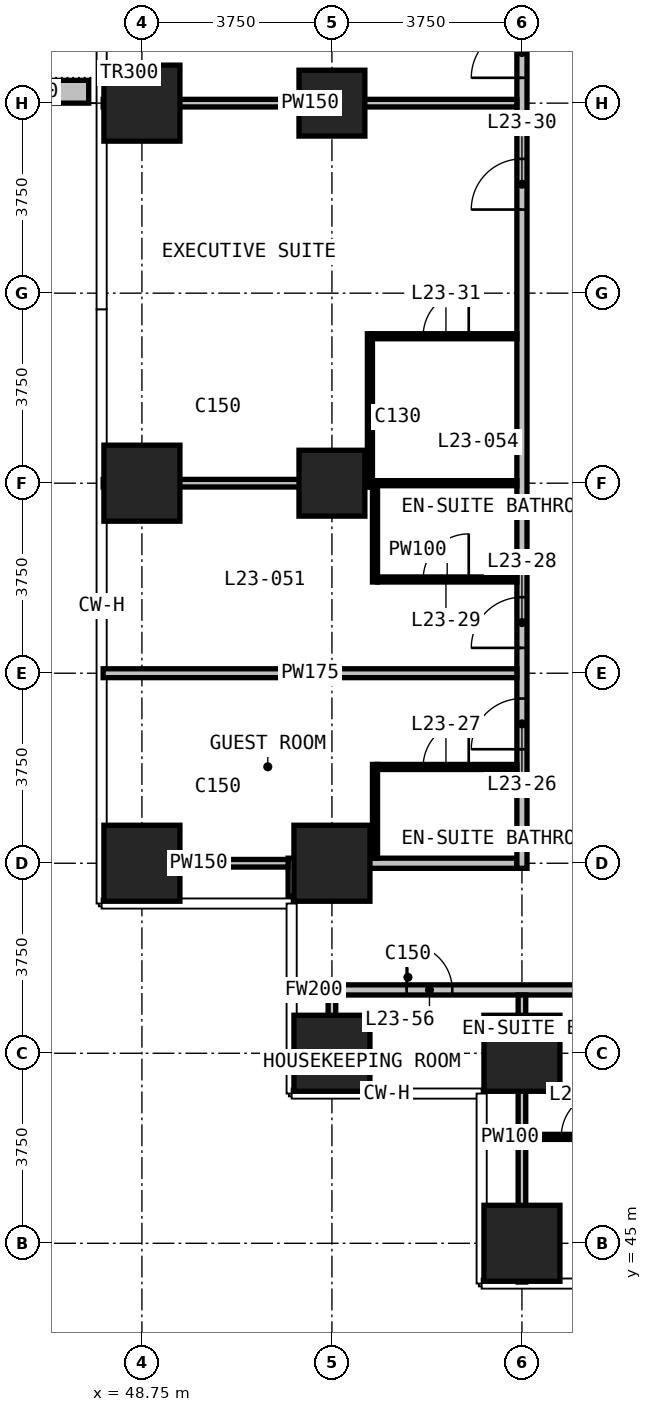
"""IFC4 building model, lengths in metres.
Left out: names, types, materials, properties, quantities, classifications, styles, units other than length and angle.
Written with IfcOpenShell. Run it as: python <this file> out.ifc"""

import sys

from ifc_helpers import new_model, si_unit, direction, frame, frame_2d, origin, origin_2d, place, context, subcontext, project, spatial, rectangle, extrude, element, fill, save


model = new_model("IFC4")
c1 = context("Model", 3, precision=1e-05, world=origin(), true_north=direction((0.0, 1.0)))
c2 = subcontext(c1, "Body", "Model", "MODEL_VIEW")
j1 = project(units=[si_unit("LENGTHUNIT", "METRE"), si_unit("PLANEANGLEUNIT", "RADIAN")], contexts=[c1])
p1 = place(None, origin())
s1 = spatial("IfcSite", under=j1, at=p1, CompositionType="ELEMENT")
p2 = place(p1, origin())
s2 = spatial("IfcBuilding", under=s1, at=p2, CompositionType="ELEMENT")
p3 = place(p2, frame((0.0, 0.0, 95.6)))
s3 = spatial("IfcBuildingStorey", under=s2, at=p3, CompositionType="ELEMENT", Elevation=95.6)
for number, where, z_axis, x_axis in (
    (1, (48.75, 52.5, 0.0), (0.0, 0.0, 1.0), (1.0, 0.0, 0.0)),
    (2, (48.75, 60.0, 0.0), (0.0, 0.0, 1.0), (1.0, 0.0, 0.0)),
    (3, (48.75, 67.5, 0.0), (0.0, 0.0, 1.0), (1.0, 0.0, 0.0)),
    (4, (52.5, 48.75, 0.0), (0.0, 0.0, 1.0), (1.0, 0.0, 0.0)),
    (5, (52.5, 52.5, 0.0), (0.0, 0.0, 1.0), (1.0, 0.0, 0.0)),
):
    element("IfcColumn", number, at=place(p3, frame(where, z_axis=z_axis, x_axis=x_axis)), inside=s3, PredefinedType="COLUMN", context=c2, shape_type="SweptSolid", body=[
        extrude(rectangle(XDim=1.5, YDim=1.5, at=origin_2d()), origin(), (0.0, 0.0, 1.0), 3.3),
    ])
for number, where, z_axis, x_axis in (
    (6, (52.5, 60.0, 0.0), (0.0, 0.0, 1.0), (1.0, 0.0, 0.0)),
    (7, (52.5, 67.5, 0.0), (0.0, 0.0, 1.0), (1.0, 0.0, 0.0)),
):
    element("IfcColumn", number, at=place(p3, frame(where, z_axis=z_axis, x_axis=x_axis)), inside=s3, PredefinedType="COLUMN", context=c2, shape_type="SweptSolid", body=[
        extrude(rectangle(XDim=1.3, YDim=1.3, at=origin_2d()), origin(), (0.0, 0.0, 1.0), 3.3),
    ])
for number, where, z_axis, x_axis in (
    (8, (56.25, 45.0, 0.0), (0.0, 0.0, 1.0), (1.0, 0.0, 0.0)),
    (9, (56.25, 48.75, 0.0), (0.0, 0.0, 1.0), (1.0, 0.0, 0.0)),
):
    element("IfcColumn", number, at=place(p3, frame(where, z_axis=z_axis, x_axis=x_axis)), inside=s3, PredefinedType="COLUMN", context=c2, shape_type="SweptSolid", body=[
        extrude(rectangle(XDim=1.5, YDim=1.5, at=origin_2d()), origin(), (0.0, 0.0, 1.0), 3.3),
    ])
p4 = place(p3, frame((47.7, 67.725, 0.0), z_axis=(0.0, 0.0, 1.0), x_axis=(-1.0, 0.0, 0.0)))
e10 = element("IfcWall", 10, at=p4, inside=s3, PredefinedType="USERDEFINED", context=c2, shape_type="SweptSolid", body=[
    extrude(rectangle(XDim=2.35, YDim=0.45, at=frame_2d((1.175, 0.0))), origin(), (0.0, 0.0, 1.0), 1.1),
])
p5 = place(p3, frame((51.855, 50.0, 0.0), z_axis=(0.0, 0.0, 1.0), x_axis=(1.0, 0.0, 0.0)))
e11 = element("IfcWall", 11, at=p5, inside=s3, PredefinedType="PARTITIONING", context=c2, shape_type="SweptSolid", body=[
    extrude(rectangle(XDim=0.57, YDim=0.2, at=frame_2d((0.285, 0.0))), origin(), (0.0, 0.0, 1.0), 3.0),
])
p6 = place(p3, frame((52.575, 50.0, 0.0), z_axis=(0.0, 0.0, 1.0), x_axis=(1.0, 0.0, 0.0)))
e12 = element("IfcWall", 12, at=p6, inside=s3, PredefinedType="PARTITIONING", context=c2, shape_type="SweptSolid", body=[
    extrude(rectangle(XDim=44.85, YDim=0.2, at=frame_2d((22.425, 0.0))), origin(), (0.0, 0.0, 1.0), 3.0),
])
p7 = place(p6, frame((5.925, 0.0, 0.0)))
e13 = element("IfcOpeningElement", 13, at=p7, cuts=e12, PredefinedType="OPENING", context=c2, shape_type="SweptSolid", body=[
    extrude(rectangle(XDim=1.0, YDim=2.2, at=frame_2d((0.5, 1.1))), frame((0.0, 0.11, 0.0), z_axis=(0.0, -1.0, 0.0), x_axis=(1.0, 0.0, 0.0)), (0.0, 0.0, 1.0), 0.22),
])
p8 = place(p6, frame((7.925, 0.0, 0.0)))
e14 = element("IfcOpeningElement", 14, at=p8, cuts=e12, PredefinedType="OPENING", context=c2, shape_type="SweptSolid", body=[
    extrude(rectangle(XDim=1.0, YDim=2.2, at=frame_2d((0.5, 1.1))), frame((0.0, 0.11, 0.0), z_axis=(0.0, -1.0, 0.0), x_axis=(1.0, 0.0, 0.0)), (0.0, 0.0, 1.0), 0.22),
])
p9 = place(p6, frame((13.425, 0.0, 0.0)))
e15 = element("IfcOpeningElement", 15, at=p9, cuts=e12, PredefinedType="OPENING", context=c2, shape_type="SweptSolid", body=[
    extrude(rectangle(XDim=1.0, YDim=2.2, at=frame_2d((0.5, 1.1))), frame((0.0, 0.11, 0.0), z_axis=(0.0, -1.0, 0.0), x_axis=(1.0, 0.0, 0.0)), (0.0, 0.0, 1.0), 0.22),
])
p10 = place(p6, frame((15.425, 0.0, 0.0)))
e16 = element("IfcOpeningElement", 16, at=p10, cuts=e12, PredefinedType="OPENING", context=c2, shape_type="SweptSolid", body=[
    extrude(rectangle(XDim=1.0, YDim=2.2, at=frame_2d((0.5, 1.1))), frame((0.0, 0.11, 0.0), z_axis=(0.0, -1.0, 0.0), x_axis=(1.0, 0.0, 0.0)), (0.0, 0.0, 1.0), 0.22),
])
p11 = place(p6, frame((20.925, 0.0, 0.0)))
e17 = element("IfcOpeningElement", 17, at=p11, cuts=e12, PredefinedType="OPENING", context=c2, shape_type="SweptSolid", body=[
    extrude(rectangle(XDim=1.0, YDim=2.2, at=frame_2d((0.5, 1.1))), frame((0.0, 0.11, 0.0), z_axis=(0.0, -1.0, 0.0), x_axis=(1.0, 0.0, 0.0)), (0.0, 0.0, 1.0), 0.22),
])
p12 = place(p6, frame((22.925, 0.0, 0.0)))
e18 = element("IfcOpeningElement", 18, at=p12, cuts=e12, PredefinedType="OPENING", context=c2, shape_type="SweptSolid", body=[
    extrude(rectangle(XDim=1.0, YDim=2.2, at=frame_2d((0.5, 1.1))), frame((0.0, 0.11, 0.0), z_axis=(0.0, -1.0, 0.0), x_axis=(1.0, 0.0, 0.0)), (0.0, 0.0, 1.0), 0.22),
])
p13 = place(p6, frame((28.425, 0.0, 0.0)))
e19 = element("IfcOpeningElement", 19, at=p13, cuts=e12, PredefinedType="OPENING", context=c2, shape_type="SweptSolid", body=[
    extrude(rectangle(XDim=1.0, YDim=2.2, at=frame_2d((0.5, 1.1))), frame((0.0, 0.11, 0.0), z_axis=(0.0, -1.0, 0.0), x_axis=(1.0, 0.0, 0.0)), (0.0, 0.0, 1.0), 0.22),
])
p14 = place(p6, frame((30.425, 0.0, 0.0)))
e20 = element("IfcOpeningElement", 20, at=p14, cuts=e12, PredefinedType="OPENING", context=c2, shape_type="SweptSolid", body=[
    extrude(rectangle(XDim=1.0, YDim=2.2, at=frame_2d((0.5, 1.1))), frame((0.0, 0.11, 0.0), z_axis=(0.0, -1.0, 0.0), x_axis=(1.0, 0.0, 0.0)), (0.0, 0.0, 1.0), 0.22),
])
p15 = place(p6, frame((35.925, 0.0, 0.0)))
e21 = element("IfcOpeningElement", 21, at=p15, cuts=e12, PredefinedType="OPENING", context=c2, shape_type="SweptSolid", body=[
    extrude(rectangle(XDim=1.0, YDim=2.2, at=frame_2d((0.5, 1.1))), frame((0.0, 0.11, 0.0), z_axis=(0.0, -1.0, 0.0), x_axis=(1.0, 0.0, 0.0)), (0.0, 0.0, 1.0), 0.22),
])
p16 = place(p6, frame((37.925, 0.0, 0.0)))
e22 = element("IfcOpeningElement", 22, at=p16, cuts=e12, PredefinedType="OPENING", context=c2, shape_type="SweptSolid", body=[
    extrude(rectangle(XDim=1.0, YDim=2.2, at=frame_2d((0.5, 1.1))), frame((0.0, 0.11, 0.0), z_axis=(0.0, -1.0, 0.0), x_axis=(1.0, 0.0, 0.0)), (0.0, 0.0, 1.0), 0.22),
])
p17 = place(p6, frame((1.4, 0.0, 0.0)))
e23 = element("IfcOpeningElement", 23, at=p17, cuts=e12, PredefinedType="OPENING", context=c2, shape_type="SweptSolid", body=[
    extrude(rectangle(XDim=0.9, YDim=2.2, at=frame_2d((0.45, 1.1))), frame((0.0, 0.11, 0.0), z_axis=(0.0, -1.0, 0.0), x_axis=(1.0, 0.0, 0.0)), (0.0, 0.0, 1.0), 0.22),
])
p18 = place(p6, frame((42.575, 0.0, 0.0)))
e24 = element("IfcOpeningElement", 24, at=p18, cuts=e12, PredefinedType="OPENING", context=c2, shape_type="SweptSolid", body=[
    extrude(rectangle(XDim=0.9, YDim=2.2, at=frame_2d((0.45, 1.1))), frame((0.0, 0.11, 0.0), z_axis=(0.0, -1.0, 0.0), x_axis=(1.0, 0.0, 0.0)), (0.0, 0.0, 1.0), 0.22),
])
p19 = place(p3, frame((51.835, 52.5, 0.0), z_axis=(0.0, 0.0, 1.0), x_axis=(1.0, 0.0, 0.0)))
e25 = element("IfcWall", 25, at=p19, inside=s3, PredefinedType="PARTITIONING", context=c2, shape_type="SweptSolid", body=[
    extrude(rectangle(XDim=4.315, YDim=0.2, at=frame_2d((2.157, 0.0))), origin(), (0.0, 0.0, 1.0), 3.0),
])
p20 = place(p3, frame((51.735, 51.855, 0.0), z_axis=(0.0, 0.0, 1.0), x_axis=(0.0, 1.0, 0.0)))
e26 = element("IfcWall", 26, at=p20, inside=s3, PredefinedType="PARTITIONING", context=c2, shape_type="SweptSolid", body=[
    extrude(rectangle(XDim=0.745, YDim=0.2, at=frame_2d((0.373, 0.0))), origin(), (0.0, 0.0, 1.0), 3.0),
])
p21 = place(p3, frame((56.25, 52.4, 0.0), z_axis=(0.0, 0.0, 1.0), x_axis=(0.0, 1.0, 0.0)))
e27 = element("IfcWall", 27, at=p21, inside=s3, PredefinedType="PARTITIONING", context=c2, shape_type="SweptSolid", body=[
    extrude(rectangle(XDim=38.31, YDim=0.2, at=frame_2d((19.155, 0.0))), origin(), (0.0, 0.0, 1.0), 3.0),
])
p22 = place(p21, frame((2.35, 0.0, 0.0)))
e28 = element("IfcOpeningElement", 28, at=p22, cuts=e27, PredefinedType="OPENING", context=c2, shape_type="SweptSolid", body=[
    extrude(rectangle(XDim=1.0, YDim=2.2, at=frame_2d((0.5, 1.1))), frame((0.0, 0.11, 0.0), z_axis=(0.0, -1.0, 0.0), x_axis=(1.0, 0.0, 0.0)), (0.0, 0.0, 1.0), 0.22),
])
p23 = place(p21, frame((4.35, 0.0, 0.0)))
e29 = element("IfcOpeningElement", 29, at=p23, cuts=e27, PredefinedType="OPENING", context=c2, shape_type="SweptSolid", body=[
    extrude(rectangle(XDim=1.0, YDim=2.2, at=frame_2d((0.5, 1.1))), frame((0.0, 0.11, 0.0), z_axis=(0.0, -1.0, 0.0), x_axis=(1.0, 0.0, 0.0)), (0.0, 0.0, 1.0), 0.22),
])
p24 = place(p21, frame((13.0, 0.0, 0.0)))
e30 = element("IfcOpeningElement", 30, at=p24, cuts=e27, PredefinedType="OPENING", context=c2, shape_type="SweptSolid", body=[
    extrude(rectangle(XDim=1.0, YDim=2.2, at=frame_2d((0.5, 1.1))), frame((0.0, 0.11, 0.0), z_axis=(0.0, -1.0, 0.0), x_axis=(1.0, 0.0, 0.0)), (0.0, 0.0, 1.0), 0.22),
])
p25 = place(p21, frame((15.6, 0.0, 0.0)))
e31 = element("IfcOpeningElement", 31, at=p25, cuts=e27, PredefinedType="OPENING", context=c2, shape_type="SweptSolid", body=[
    extrude(rectangle(XDim=1.0, YDim=2.2, at=frame_2d((0.5, 1.1))), frame((0.0, 0.11, 0.0), z_axis=(0.0, -1.0, 0.0), x_axis=(1.0, 0.0, 0.0)), (0.0, 0.0, 1.0), 0.22),
])
p26 = place(p21, frame((21.1, 0.0, 0.0)))
e32 = element("IfcOpeningElement", 32, at=p26, cuts=e27, PredefinedType="OPENING", context=c2, shape_type="SweptSolid", body=[
    extrude(rectangle(XDim=1.0, YDim=2.2, at=frame_2d((0.5, 1.1))), frame((0.0, 0.11, 0.0), z_axis=(0.0, -1.0, 0.0), x_axis=(1.0, 0.0, 0.0)), (0.0, 0.0, 1.0), 0.22),
])
p27 = place(p21, frame((23.7, 0.0, 0.0)))
e33 = element("IfcOpeningElement", 33, at=p27, cuts=e27, PredefinedType="OPENING", context=c2, shape_type="SweptSolid", body=[
    extrude(rectangle(XDim=1.0, YDim=2.2, at=frame_2d((0.5, 1.1))), frame((0.0, 0.11, 0.0), z_axis=(0.0, -1.0, 0.0), x_axis=(1.0, 0.0, 0.0)), (0.0, 0.0, 1.0), 0.22),
])
p28 = place(p21, frame((31.55, 0.0, 0.0)))
e34 = element("IfcOpeningElement", 34, at=p28, cuts=e27, PredefinedType="OPENING", context=c2, shape_type="SweptSolid", body=[
    extrude(rectangle(XDim=0.9, YDim=2.2, at=frame_2d((0.45, 1.1))), frame((0.0, 0.11, 0.0), z_axis=(0.0, -1.0, 0.0), x_axis=(1.0, 0.0, 0.0)), (0.0, 0.0, 1.0), 0.22),
])
p29 = place(p21, frame((35.65, 0.0, 0.0)))
e35 = element("IfcOpeningElement", 35, at=p29, cuts=e27, PredefinedType="OPENING", context=c2, shape_type="SweptSolid", body=[
    extrude(rectangle(XDim=0.9, YDim=2.2, at=frame_2d((0.45, 1.1))), frame((0.0, 0.11, 0.0), z_axis=(0.0, -1.0, 0.0), x_axis=(1.0, 0.0, 0.0)), (0.0, 0.0, 1.0), 0.22),
])
p30 = place(p3, frame((47.985, 56.25, 0.0), z_axis=(0.0, 0.0, 1.0), x_axis=(1.0, 0.0, 0.0)))
e36 = element("IfcWall", 36, at=p30, inside=s3, PredefinedType="PARTITIONING", context=c2, shape_type="SweptSolid", body=[
    extrude(rectangle(XDim=8.165, YDim=0.175, at=frame_2d((4.083, 0.0))), origin(), (0.0, 0.0, 1.0), 3.0),
])
p31 = place(p3, frame((48.105, 52.5, 0.0), z_axis=(0.0, 0.0, 1.0), x_axis=(1.0, 0.0, 0.0)))
e37 = element("IfcWall", 37, at=p31, inside=s3, PredefinedType="PARTITIONING", context=c2, shape_type="SweptSolid", body=[
    extrude(rectangle(XDim=3.53, YDim=0.15, at=frame_2d((1.765, 0.0))), origin(), (0.0, 0.0, 1.0), 3.0),
])
p32 = place(p3, frame((47.985, 60.0, 0.0), z_axis=(0.0, 0.0, 1.0), x_axis=(1.0, 0.0, 0.0)))
e38 = element("IfcWall", 38, at=p32, inside=s3, PredefinedType="PARTITIONING", context=c2, shape_type="SweptSolid", body=[
    extrude(rectangle(XDim=5.215, YDim=0.15, at=frame_2d((2.607, 0.0))), origin(), (0.0, 0.0, 1.0), 3.0),
])
p33 = place(p3, frame((47.985, 67.5, 0.0), z_axis=(0.0, 0.0, 1.0), x_axis=(1.0, 0.0, 0.0)))
e39 = element("IfcWall", 39, at=p33, inside=s3, PredefinedType="PARTITIONING", context=c2, shape_type="SweptSolid", body=[
    extrude(rectangle(XDim=8.165, YDim=0.15, at=frame_2d((4.083, 0.0))), origin(), (0.0, 0.0, 1.0), 3.0),
])
p34 = place(p3, frame((52.5, 48.105, 0.0), z_axis=(0.0, 0.0, 1.0), x_axis=(0.0, 1.0, 0.0)))
e40 = element("IfcWall", 40, at=p34, inside=s3, PredefinedType="PARTITIONING", context=c2, shape_type="SweptSolid", body=[
    extrude(rectangle(XDim=1.995, YDim=0.15, at=frame_2d((0.998, 0.0))), origin(), (0.0, 0.0, 1.0), 3.0),
])
p35 = place(p3, frame((56.25, 44.235, 0.0), z_axis=(0.0, 0.0, 1.0), x_axis=(0.0, 1.0, 0.0)))
e41 = element("IfcWall", 41, at=p35, inside=s3, PredefinedType="PARTITIONING", context=c2, shape_type="SweptSolid", body=[
    extrude(rectangle(XDim=5.665, YDim=0.15, at=frame_2d((2.833, 0.0))), origin(), (0.0, 0.0, 1.0), 3.0),
])
p36 = place(p3, frame((56.325, 47.1, 0.0), z_axis=(0.0, 0.0, 1.0), x_axis=(1.0, 0.0, 0.0)))
e42 = element("IfcWall", 42, at=p36, inside=s3, PredefinedType="PARTITIONING", context=c2, shape_type="SweptSolid", body=[
    extrude(rectangle(XDim=1.775, YDim=0.1, at=frame_2d((0.888, 0.0))), origin(), (0.0, 0.0, 1.0), 3.0),
])
p37 = place(p36, frame((0.7, 0.0, 0.0)))
e43 = element("IfcOpeningElement", 43, at=p37, cuts=e42, PredefinedType="OPENING", context=c2, shape_type="SweptSolid", body=[
    extrude(rectangle(XDim=0.9, YDim=2.2, at=frame_2d((0.45, 1.1))), frame((0.0, 0.06, 0.0), z_axis=(0.0, -1.0, 0.0), x_axis=(1.0, 0.0, 0.0)), (0.0, 0.0, 1.0), 0.12),
])
p38 = place(p3, frame((53.4, 54.4, 0.0), z_axis=(0.0, 0.0, 1.0), x_axis=(1.0, 0.0, 0.0)))
e44 = element("IfcWall", 44, at=p38, inside=s3, PredefinedType="PARTITIONING", context=c2, shape_type="SweptSolid", body=[
    extrude(rectangle(XDim=2.75, YDim=0.1, at=frame_2d((1.375, 0.0))), origin(), (0.0, 0.0, 1.0), 3.0),
])
p39 = place(p38, frame((0.9, 0.0, 0.0)))
e45 = element("IfcOpeningElement", 45, at=p39, cuts=e44, PredefinedType="OPENING", context=c2, shape_type="SweptSolid", body=[
    extrude(rectangle(XDim=0.9, YDim=2.2, at=frame_2d((0.45, 1.1))), frame((0.0, 0.06, 0.0), z_axis=(0.0, -1.0, 0.0), x_axis=(1.0, 0.0, 0.0)), (0.0, 0.0, 1.0), 0.12),
])
p40 = place(p3, frame((53.4, 58.1, 0.0), z_axis=(0.0, 0.0, 1.0), x_axis=(1.0, 0.0, 0.0)))
e46 = element("IfcWall", 46, at=p40, inside=s3, PredefinedType="PARTITIONING", context=c2, shape_type="SweptSolid", body=[
    extrude(rectangle(XDim=2.75, YDim=0.1, at=frame_2d((1.375, 0.0))), origin(), (0.0, 0.0, 1.0), 3.0),
])
p41 = place(p40, frame((0.9, 0.0, 0.0)))
e47 = element("IfcOpeningElement", 47, at=p41, cuts=e46, PredefinedType="OPENING", context=c2, shape_type="SweptSolid", body=[
    extrude(rectangle(XDim=0.9, YDim=2.2, at=frame_2d((0.45, 1.1))), frame((0.0, 0.06, 0.0), z_axis=(0.0, -1.0, 0.0), x_axis=(1.0, 0.0, 0.0)), (0.0, 0.0, 1.0), 0.12),
])
p42 = place(p3, frame((53.4, 60.0, 0.0), z_axis=(0.0, 0.0, 1.0), x_axis=(1.0, 0.0, 0.0)))
e48 = element("IfcWall", 48, at=p42, inside=s3, PredefinedType="PARTITIONING", context=c2, shape_type="SweptSolid", body=[
    extrude(rectangle(XDim=2.75, YDim=0.1, at=frame_2d((1.375, 0.0))), origin(), (0.0, 0.0, 1.0), 3.0),
])
p43 = place(p3, frame((53.3, 62.9, 0.0), z_axis=(0.0, 0.0, 1.0), x_axis=(1.0, 0.0, 0.0)))
e49 = element("IfcWall", 49, at=p43, inside=s3, PredefinedType="PARTITIONING", context=c2, shape_type="SweptSolid", body=[
    extrude(rectangle(XDim=2.85, YDim=0.1, at=frame_2d((1.425, 0.0))), origin(), (0.0, 0.0, 1.0), 3.0),
])
p44 = place(p43, frame((1.0, 0.0, 0.0)))
e50 = element("IfcOpeningElement", 50, at=p44, cuts=e49, PredefinedType="OPENING", context=c2, shape_type="SweptSolid", body=[
    extrude(rectangle(XDim=0.9, YDim=2.2, at=frame_2d((0.45, 1.1))), frame((0.0, 0.06, 0.0), z_axis=(0.0, -1.0, 0.0), x_axis=(1.0, 0.0, 0.0)), (0.0, 0.0, 1.0), 0.12),
])
p45 = place(p3, frame((53.25, 59.925, 0.0), z_axis=(0.0, 0.0, 1.0), x_axis=(0.0, 1.0, 0.0)))
e51 = element("IfcWall", 51, at=p45, inside=s3, PredefinedType="PARTITIONING", context=c2, shape_type="SweptSolid", body=[
    extrude(rectangle(XDim=3.025, YDim=0.1, at=frame_2d((1.512, 0.0))), origin(), (0.0, 0.0, 1.0), 3.0),
])
p46 = place(p3, frame((53.35, 52.6, 0.0), z_axis=(0.0, 0.0, 1.0), x_axis=(0.0, 1.0, 0.0)))
e52 = element("IfcWall", 52, at=p46, inside=s3, PredefinedType="PARTITIONING", context=c2, shape_type="SweptSolid", body=[
    extrude(rectangle(XDim=1.85, YDim=0.1, at=frame_2d((0.925, 0.0))), origin(), (0.0, 0.0, 1.0), 3.0),
])
p47 = place(p3, frame((53.35, 58.05, 0.0), z_axis=(0.0, 0.0, 1.0), x_axis=(0.0, 1.0, 0.0)))
e53 = element("IfcWall", 53, at=p47, inside=s3, PredefinedType="PARTITIONING", context=c2, shape_type="SweptSolid", body=[
    extrude(rectangle(XDim=2.0, YDim=0.1, at=frame_2d((1.0, 0.0))), origin(), (0.0, 0.0, 1.0), 3.0),
])
p48 = place(p37, origin())
e54 = element("IfcDoor", 54, at=p48, inside=s3, OperationType="SINGLE_SWING_RIGHT", PredefinedType="DOOR", context=c2, shape_type="SweptSolid", body=[
    extrude(rectangle(XDim=0.9, YDim=2.2, at=frame_2d((0.45, 1.1))), frame((0.0, 0.025, 0.0), z_axis=(0.0, -1.0, 0.0), x_axis=(1.0, 0.0, 0.0)), (0.0, 0.0, 1.0), 0.05),
])
fill(e43, e54)
p49 = place(p22, origin())
e55 = element("IfcDoor", 55, at=p49, inside=s3, OperationType="SINGLE_SWING_LEFT", PredefinedType="DOOR", context=c2, shape_type="SweptSolid", body=[
    extrude(rectangle(XDim=1.0, YDim=2.2, at=frame_2d((0.5, 1.1))), frame((0.0, 0.025, 0.0), z_axis=(0.0, -1.0, 0.0), x_axis=(1.0, 0.0, 0.0)), (0.0, 0.0, 1.0), 0.05),
])
fill(e28, e55)
p50 = place(p39, origin())
e56 = element("IfcDoor", 56, at=p50, inside=s3, OperationType="SINGLE_SWING_RIGHT", PredefinedType="DOOR", context=c2, shape_type="SweptSolid", body=[
    extrude(rectangle(XDim=0.9, YDim=2.2, at=frame_2d((0.45, 1.1))), frame((0.0, 0.025, 0.0), z_axis=(0.0, -1.0, 0.0), x_axis=(1.0, 0.0, 0.0)), (0.0, 0.0, 1.0), 0.05),
])
fill(e45, e56)
p51 = place(p23, origin())
e57 = element("IfcDoor", 57, at=p51, inside=s3, OperationType="SINGLE_SWING_LEFT", PredefinedType="DOOR", context=c2, shape_type="SweptSolid", body=[
    extrude(rectangle(XDim=1.0, YDim=2.2, at=frame_2d((0.5, 1.1))), frame((0.0, 0.025, 0.0), z_axis=(0.0, -1.0, 0.0), x_axis=(1.0, 0.0, 0.0)), (0.0, 0.0, 1.0), 0.05),
])
fill(e29, e57)
p52 = place(p41, origin())
e58 = element("IfcDoor", 58, at=p52, inside=s3, OperationType="SINGLE_SWING_RIGHT", PredefinedType="DOOR", context=c2, shape_type="SweptSolid", body=[
    extrude(rectangle(XDim=0.9, YDim=2.2, at=frame_2d((0.45, 1.1))), frame((0.0, 0.025, 0.0), z_axis=(0.0, -1.0, 0.0), x_axis=(1.0, 0.0, 0.0)), (0.0, 0.0, 1.0), 0.05),
])
fill(e47, e58)
p53 = place(p24, origin())
e59 = element("IfcDoor", 59, at=p53, inside=s3, OperationType="SINGLE_SWING_LEFT", PredefinedType="DOOR", context=c2, shape_type="SweptSolid", body=[
    extrude(rectangle(XDim=1.0, YDim=2.2, at=frame_2d((0.5, 1.1))), frame((0.0, 0.025, 0.0), z_axis=(0.0, -1.0, 0.0), x_axis=(1.0, 0.0, 0.0)), (0.0, 0.0, 1.0), 0.05),
])
fill(e30, e59)
p54 = place(p44, origin())
e60 = element("IfcDoor", 60, at=p54, inside=s3, OperationType="SINGLE_SWING_RIGHT", PredefinedType="DOOR", context=c2, shape_type="SweptSolid", body=[
    extrude(rectangle(XDim=0.9, YDim=2.2, at=frame_2d((0.45, 1.1))), frame((0.0, 0.025, 0.0), z_axis=(0.0, -1.0, 0.0), x_axis=(1.0, 0.0, 0.0)), (0.0, 0.0, 1.0), 0.05),
])
fill(e50, e60)
p55 = place(p25, origin())
e61 = element("IfcDoor", 61, at=p55, inside=s3, OperationType="SINGLE_SWING_LEFT", PredefinedType="DOOR", context=c2, shape_type="SweptSolid", body=[
    extrude(rectangle(XDim=1.0, YDim=2.2, at=frame_2d((0.5, 1.1))), frame((0.0, 0.025, 0.0), z_axis=(0.0, -1.0, 0.0), x_axis=(1.0, 0.0, 0.0)), (0.0, 0.0, 1.0), 0.05),
])
fill(e31, e61)
p56 = place(p17, origin())
e62 = element("IfcDoor", 62, at=p56, inside=s3, OperationType="SINGLE_SWING_LEFT", PredefinedType="DOOR", context=c2, shape_type="SweptSolid", body=[
    extrude(rectangle(XDim=0.9, YDim=2.2, at=frame_2d((0.45, 1.1))), frame((0.0, 0.025, 0.0), z_axis=(0.0, -1.0, 0.0), x_axis=(1.0, 0.0, 0.0)), (0.0, 0.0, 1.0), 0.05),
])
fill(e23, e62)
save(model, sys.argv[1])
